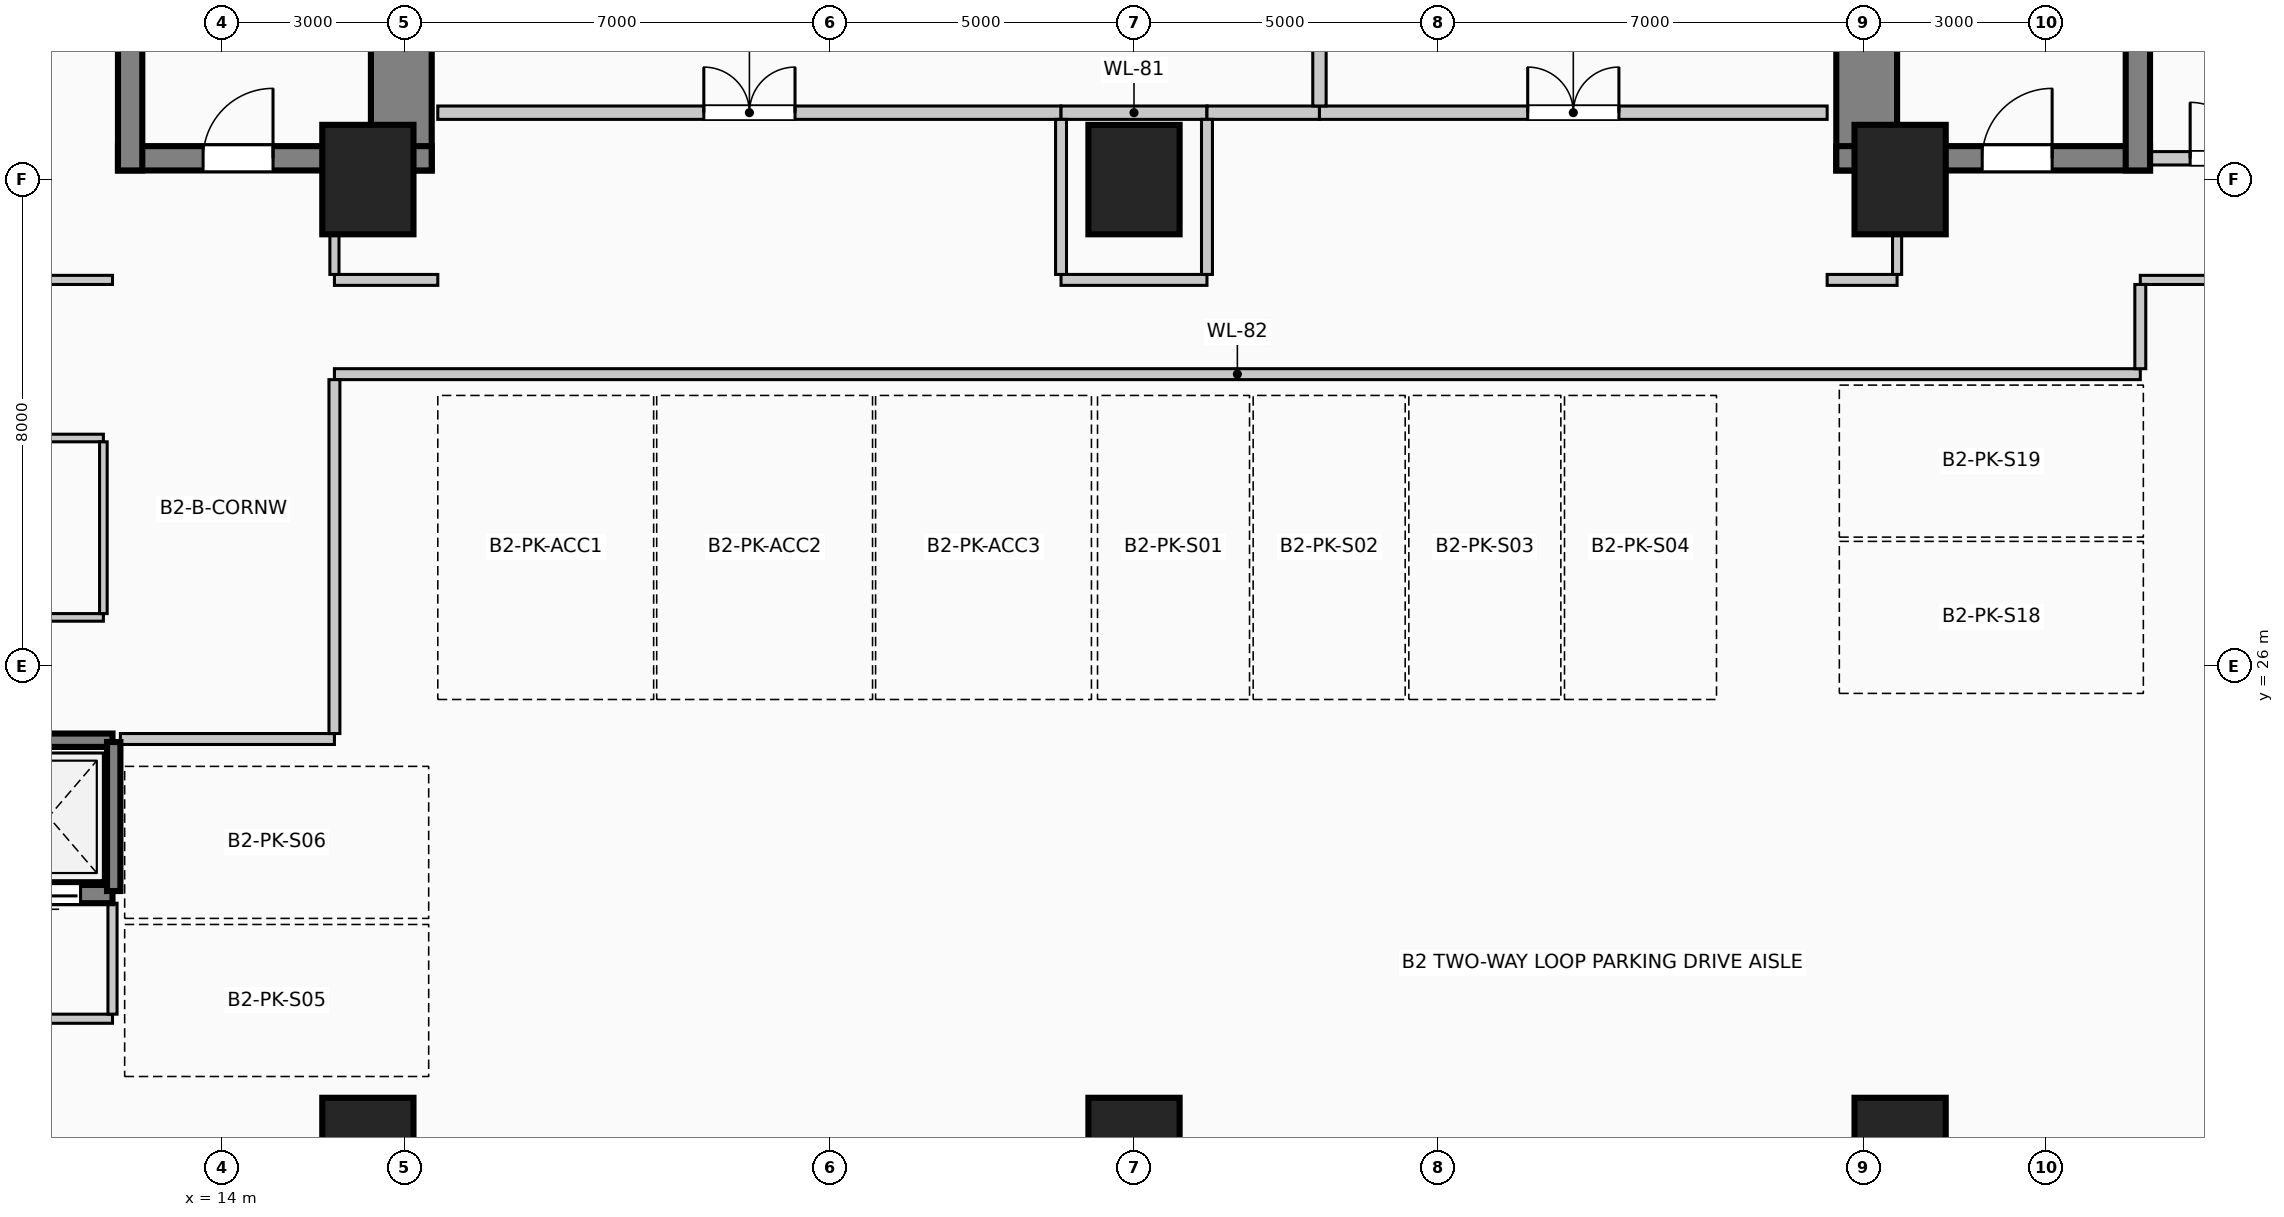
"""IFC4 building model, lengths in metres.
Left out: names, types, materials, properties, quantities, classifications, styles, units other than length and angle.
Written with IfcOpenShell. Run it as: python <this file> out.ifc"""

import sys

from ifc_helpers import new_model, si_unit, direction, frame, frame_2d, origin, origin_2d, place, context, subcontext, project, spatial, rectangle, extrude, element, fill, save


model = new_model("IFC4")
c1 = context("Model", 3, precision=1e-05, world=origin(), true_north=direction((0.0, 1.0)))
c2 = subcontext(c1, "Body", "Model", "MODEL_VIEW")
j1 = project(units=[si_unit("LENGTHUNIT", "METRE"), si_unit("PLANEANGLEUNIT", "RADIAN")], contexts=[c1])
p1 = place(None, origin())
s1 = spatial("IfcSite", under=j1, at=p1, CompositionType="ELEMENT")
p2 = place(p1, origin())
s2 = spatial("IfcBuilding", under=s1, at=p2, CompositionType="ELEMENT")
p3 = place(p2, frame((0.0, 0.0, -9.0)))
s3 = spatial("IfcBuildingStorey", under=s2, at=p3, CompositionType="ELEMENT", Elevation=-9.0)
p4 = place(p3, frame((16.95, 34.15, 0.0), z_axis=(0.0, 0.0, 1.0), x_axis=(0.0, 1.0, 0.0)))
e1 = element("IfcWall", 1, at=p4, inside=s3, PredefinedType="SHEAR", context=c2, shape_type="SweptSolid", body=[
    extrude(rectangle(XDim=9.28, YDim=1.0, at=frame_2d((4.64, 0.0))), origin(), (0.0, 0.0, 1.0), 4.5),
])
p5 = place(p3, frame((12.29, 34.35, 0.0), z_axis=(0.0, 0.0, 1.0), x_axis=(1.0, 0.0, 0.0)))
e2 = element("IfcWall", 2, at=p5, inside=s3, PredefinedType="SHEAR", context=c2, shape_type="SweptSolid", body=[
    extrude(rectangle(XDim=5.16, YDim=0.4, at=frame_2d((2.58, 0.0))), origin(), (0.0, 0.0, 1.0), 4.5),
])
p6 = place(p5, frame((1.4, 0.0, 0.0)))
e3 = element("IfcOpeningElement", 3, at=p6, cuts=e2, PredefinedType="OPENING", context=c2, shape_type="SweptSolid", body=[
    extrude(rectangle(XDim=1.15, YDim=2.2, at=frame_2d((0.575, 1.1))), frame((0.0, 0.21, 0.0), z_axis=(0.0, -1.0, 0.0), x_axis=(1.0, 0.0, 0.0)), (0.0, 0.0, 1.0), 0.42),
])
p7 = place(p3, frame((12.49, 34.15, 0.0), z_axis=(0.0, 0.0, 1.0), x_axis=(0.0, 1.0, 0.0)))
e4 = element("IfcWall", 4, at=p7, inside=s3, PredefinedType="SHEAR", context=c2, shape_type="SweptSolid", body=[
    extrude(rectangle(XDim=9.28, YDim=0.4, at=frame_2d((4.64, 0.0))), origin(), (0.0, 0.0, 1.0), 4.5),
])
p8 = place(p3, frame((41.05, 34.15, 0.0), z_axis=(0.0, 0.0, 1.0), x_axis=(0.0, 1.0, 0.0)))
e5 = element("IfcWall", 5, at=p8, inside=s3, PredefinedType="SHEAR", context=c2, shape_type="SweptSolid", body=[
    extrude(rectangle(XDim=9.28, YDim=1.0, at=frame_2d((4.64, 0.0))), origin(), (0.0, 0.0, 1.0), 4.5),
])
p9 = place(p3, frame((40.55, 34.35, 0.0), z_axis=(0.0, 0.0, 1.0), x_axis=(1.0, 0.0, 0.0)))
e6 = element("IfcWall", 6, at=p9, inside=s3, PredefinedType="SHEAR", context=c2, shape_type="SweptSolid", body=[
    extrude(rectangle(XDim=5.16, YDim=0.4, at=frame_2d((2.58, 0.0))), origin(), (0.0, 0.0, 1.0), 4.5),
])
p10 = place(p9, frame((2.4, 0.0, 0.0)))
e7 = element("IfcOpeningElement", 7, at=p10, cuts=e6, PredefinedType="OPENING", context=c2, shape_type="SweptSolid", body=[
    extrude(rectangle(XDim=1.15, YDim=2.2, at=frame_2d((0.575, 1.1))), frame((0.0, 0.21, 0.0), z_axis=(0.0, -1.0, 0.0), x_axis=(1.0, 0.0, 0.0)), (0.0, 0.0, 1.0), 0.42),
])
p11 = place(p3, frame((45.51, 34.15, 0.0), z_axis=(0.0, 0.0, 1.0), x_axis=(0.0, 1.0, 0.0)))
e8 = element("IfcWall", 8, at=p11, inside=s3, PredefinedType="SHEAR", context=c2, shape_type="SweptSolid", body=[
    extrude(rectangle(XDim=9.28, YDim=0.4, at=frame_2d((4.64, 0.0))), origin(), (0.0, 0.0, 1.0), 4.5),
])
for number, where, z_axis, x_axis in (
    (9, (16.4, 18.0, 0.0), (0.0, 0.0, 1.0), (1.0, 0.0, 0.0)),
    (10, (16.4, 34.0, 0.0), (0.0, 0.0, 1.0), (1.0, 0.0, 0.0)),
    (11, (29.0, 18.0, 0.0), (0.0, 0.0, 1.0), (1.0, 0.0, 0.0)),
    (12, (29.0, 34.0, 0.0), (0.0, 0.0, 1.0), (1.0, 0.0, 0.0)),
    (13, (41.6, 18.0, 0.0), (0.0, 0.0, 1.0), (1.0, 0.0, 0.0)),
    (14, (41.6, 34.0, 0.0), (0.0, 0.0, 1.0), (1.0, 0.0, 0.0)),
):
    element("IfcColumn", number, at=place(p3, frame(where, z_axis=z_axis, x_axis=x_axis)), inside=s3, PredefinedType="COLUMN", context=c2, shape_type="SweptSolid", body=[
        extrude(rectangle(XDim=1.5, YDim=1.8, at=origin_2d()), origin(), (0.0, 0.0, 1.0), 4.5),
    ])
p12 = place(p3, frame((12.2, 22.25, 0.0), z_axis=(0.0, 0.0, 1.0), x_axis=(-1.0, 0.0, 0.0)))
e15 = element("IfcWall", 15, at=p12, inside=s3, PredefinedType="SOLIDWALL", context=c2, shape_type="SweptSolid", body=[
    extrude(rectangle(XDim=2.15, YDim=0.3, at=frame_2d((1.075, 0.0))), origin(), (0.0, 0.0, 1.0), 4.5),
])
p13 = place(p12, frame((0.525, 0.0, 0.0)))
e16 = element("IfcOpeningElement", 16, at=p13, cuts=e15, PredefinedType="OPENING", context=c2, shape_type="SweptSolid", body=[
    extrude(rectangle(XDim=1.1, YDim=2.2, at=frame_2d((0.55, 1.1))), frame((0.0, 0.16, 0.0), z_axis=(0.0, -1.0, 0.0), x_axis=(1.0, 0.0, 0.0)), (0.0, 0.0, 1.0), 0.32),
])
p14 = place(p3, frame((3.55, 24.78, 0.0), z_axis=(0.0, 0.0, 1.0), x_axis=(1.0, 0.0, 0.0)))
e17 = element("IfcWall", 17, at=p14, inside=s3, PredefinedType="SOLIDWALL", context=c2, shape_type="SweptSolid", body=[
    extrude(rectangle(XDim=8.65, YDim=0.22, at=frame_2d((4.325, 0.0))), origin(), (0.0, 0.0, 1.0), 4.5),
])
p15 = place(p3, frame((12.22, 22.3, 0.0), z_axis=(0.0, 0.0, 1.0), x_axis=(0.0, 1.0, 0.0)))
e18 = element("IfcWall", 18, at=p15, inside=s3, PredefinedType="SOLIDWALL", context=c2, shape_type="SweptSolid", body=[
    extrude(rectangle(XDim=2.45, YDim=0.22, at=frame_2d((1.225, 0.0))), origin(), (0.0, 0.0, 1.0), 4.5),
])
p16 = place(p3, frame((45.72, 34.35, 0.0), z_axis=(0.0, 0.0, 1.0), x_axis=(1.0, 0.0, 0.0)))
e19 = element("IfcWall", 19, at=p16, inside=s3, PredefinedType="PARTITIONING", context=c2, shape_type="SweptSolid", body=[
    extrude(rectangle(XDim=4.56, YDim=0.22, at=frame_2d((2.28, 0.0))), origin(), (0.0, 0.0, 1.0), 3.145),
])
p17 = place(p16, frame((0.65, 0.0, 0.0)))
e20 = element("IfcOpeningElement", 20, at=p17, cuts=e19, PredefinedType="OPENING", context=c2, shape_type="SweptSolid", body=[
    extrude(rectangle(XDim=0.92, YDim=2.1, at=frame_2d((0.46, 1.05))), frame((0.0, 0.12, 0.0), z_axis=(0.0, -1.0, 0.0), x_axis=(1.0, 0.0, 0.0)), (0.0, 0.0, 1.0), 0.24),
])
p18 = place(p16, frame((2.95, 0.0, 0.0)))
e21 = element("IfcOpeningElement", 21, at=p18, cuts=e19, PredefinedType="OPENING", context=c2, shape_type="SweptSolid", body=[
    extrude(rectangle(XDim=0.88, YDim=2.1, at=frame_2d((0.44, 1.05))), frame((0.0, 0.12, 0.0), z_axis=(0.0, -1.0, 0.0), x_axis=(1.0, 0.0, 0.0)), (0.0, 0.0, 1.0), 0.24),
])
p19 = place(p3, frame((3.55, 20.2, 0.0), z_axis=(0.0, 0.0, 1.0), x_axis=(1.0, 0.0, 0.0)))
e22 = element("IfcWall", 22, at=p19, inside=s3, PredefinedType="PARTITIONING", context=c2, shape_type="SweptSolid", body=[
    extrude(rectangle(XDim=8.65, YDim=0.15, at=frame_2d((4.325, 0.0))), origin(), (0.0, 0.0, 1.0), 4.1),
])
p20 = place(p3, frame((12.33, 24.8, 0.0), z_axis=(0.0, 0.0, 1.0), x_axis=(1.0, 0.0, 0.0)))
e23 = element("IfcWall", 23, at=p20, inside=s3, PredefinedType="PARTITIONING", context=c2, shape_type="SweptSolid", body=[
    extrude(rectangle(XDim=3.52, YDim=0.18, at=frame_2d((1.76, 0.0))), origin(), (0.0, 0.0, 1.0), 4.1),
])
p21 = place(p3, frame((7.85, 26.8, 0.0), z_axis=(0.0, 0.0, 1.0), x_axis=(1.0, 0.0, 0.0)))
e24 = element("IfcWall", 24, at=p21, inside=s3, PredefinedType="PARTITIONING", context=c2, shape_type="SweptSolid", body=[
    extrude(rectangle(XDim=4.2, YDim=0.125, at=frame_2d((2.1, 0.0))), origin(), (0.0, 0.0, 1.0), 4.1),
])
p22 = place(p21, frame((1.64, 0.0, 0.0)))
e25 = element("IfcOpeningElement", 25, at=p22, cuts=e24, PredefinedType="OPENING", context=c2, shape_type="SweptSolid", body=[
    extrude(rectangle(XDim=0.92, YDim=2.1, at=frame_2d((0.46, 1.05))), frame((0.0, 0.073, 0.0), z_axis=(0.0, -1.0, 0.0), x_axis=(1.0, 0.0, 0.0)), (0.0, 0.0, 1.0), 0.145),
])
p23 = place(p3, frame((7.85, 29.75, 0.0), z_axis=(0.0, 0.0, 1.0), x_axis=(1.0, 0.0, 0.0)))
e26 = element("IfcWall", 26, at=p23, inside=s3, PredefinedType="PARTITIONING", context=c2, shape_type="SweptSolid", body=[
    extrude(rectangle(XDim=4.2, YDim=0.125, at=frame_2d((2.1, 0.0))), origin(), (0.0, 0.0, 1.0), 4.1),
])
p24 = place(p3, frame((15.85, 30.8, 0.0), z_axis=(0.0, 0.0, 1.0), x_axis=(1.0, 0.0, 0.0)))
e27 = element("IfcWall", 27, at=p24, inside=s3, PredefinedType="PARTITIONING", context=c2, shape_type="SweptSolid", body=[
    extrude(rectangle(XDim=29.7, YDim=0.18, at=frame_2d((14.85, 0.0))), origin(), (0.0, 0.0, 1.0), 4.1),
])
p25 = place(p3, frame((3.55, 32.35, 0.0), z_axis=(0.0, 0.0, 1.0), x_axis=(1.0, 0.0, 0.0)))
e28 = element("IfcWall", 28, at=p25, inside=s3, PredefinedType="PARTITIONING", context=c2, shape_type="SweptSolid", body=[
    extrude(rectangle(XDim=8.65, YDim=0.15, at=frame_2d((4.325, 0.0))), origin(), (0.0, 0.0, 1.0), 4.1),
])
p26 = place(p3, frame((15.85, 32.35, 0.0), z_axis=(0.0, 0.0, 1.0), x_axis=(1.0, 0.0, 0.0)))
e29 = element("IfcWall", 29, at=p26, inside=s3, PredefinedType="PARTITIONING", context=c2, shape_type="SweptSolid", body=[
    extrude(rectangle(XDim=1.7, YDim=0.18, at=frame_2d((0.85, 0.0))), origin(), (0.0, 0.0, 1.0), 4.1),
])
p27 = place(p3, frame((27.8, 32.35, 0.0), z_axis=(0.0, 0.0, 1.0), x_axis=(1.0, 0.0, 0.0)))
e30 = element("IfcWall", 30, at=p27, inside=s3, PredefinedType="PARTITIONING", context=c2, shape_type="SweptSolid", body=[
    extrude(rectangle(XDim=2.4, YDim=0.18, at=frame_2d((1.2, 0.0))), origin(), (0.0, 0.0, 1.0), 4.1),
])
p28 = place(p3, frame((40.4, 32.35, 0.0), z_axis=(0.0, 0.0, 1.0), x_axis=(1.0, 0.0, 0.0)))
e31 = element("IfcWall", 31, at=p28, inside=s3, PredefinedType="PARTITIONING", context=c2, shape_type="SweptSolid", body=[
    extrude(rectangle(XDim=1.15, YDim=0.18, at=frame_2d((0.575, 0.0))), origin(), (0.0, 0.0, 1.0), 4.1),
])
p29 = place(p3, frame((45.55, 32.35, 0.0), z_axis=(0.0, 0.0, 1.0), x_axis=(1.0, 0.0, 0.0)))
e32 = element("IfcWall", 32, at=p29, inside=s3, PredefinedType="PARTITIONING", context=c2, shape_type="SweptSolid", body=[
    extrude(rectangle(XDim=8.9, YDim=0.15, at=frame_2d((4.45, 0.0))), origin(), (0.0, 0.0, 1.0), 4.1),
])
p30 = place(p3, frame((17.55, 35.1, 0.0), z_axis=(0.0, 0.0, 1.0), x_axis=(1.0, 0.0, 0.0)))
e33 = element("IfcWall", 33, at=p30, inside=s3, PredefinedType="PARTITIONING", context=c2, shape_type="SweptSolid", body=[
    extrude(rectangle(XDim=10.25, YDim=0.22, at=frame_2d((5.125, 0.0))), origin(), (0.0, 0.0, 1.0), 4.1),
])
p31 = place(p30, frame((4.375, 0.0, 0.0)))
e34 = element("IfcOpeningElement", 34, at=p31, cuts=e33, PredefinedType="OPENING", context=c2, shape_type="SweptSolid", body=[
    extrude(rectangle(XDim=1.5, YDim=2.25, at=frame_2d((0.75, 1.125))), frame((0.0, 0.12, 0.0), z_axis=(0.0, -1.0, 0.0), x_axis=(1.0, 0.0, 0.0)), (0.0, 0.0, 1.0), 0.24),
])
p32 = place(p3, frame((27.8, 35.1, 0.0), z_axis=(0.0, 0.0, 1.0), x_axis=(1.0, 0.0, 0.0)))
e35 = element("IfcWall", 35, at=p32, inside=s3, PredefinedType="PARTITIONING", context=c2, shape_type="SweptSolid", body=[
    extrude(rectangle(XDim=2.4, YDim=0.22, at=frame_2d((1.2, 0.0))), origin(), (0.0, 0.0, 1.0), 4.1),
])
p33 = place(p3, frame((30.2, 35.1, 0.0), z_axis=(0.0, 0.0, 1.0), x_axis=(1.0, 0.0, 0.0)))
e36 = element("IfcWall", 36, at=p33, inside=s3, PredefinedType="PARTITIONING", context=c2, shape_type="SweptSolid", body=[
    extrude(rectangle(XDim=1.85, YDim=0.22, at=frame_2d((0.925, 0.0))), origin(), (0.0, 0.0, 1.0), 4.1),
])
p34 = place(p3, frame((32.05, 35.1, 0.0), z_axis=(0.0, 0.0, 1.0), x_axis=(1.0, 0.0, 0.0)))
e37 = element("IfcWall", 37, at=p34, inside=s3, PredefinedType="PARTITIONING", context=c2, shape_type="SweptSolid", body=[
    extrude(rectangle(XDim=8.35, YDim=0.22, at=frame_2d((4.175, 0.0))), origin(), (0.0, 0.0, 1.0), 4.1),
])
p35 = place(p34, frame((3.425, 0.0, 0.0)))
e38 = element("IfcOpeningElement", 38, at=p35, cuts=e37, PredefinedType="OPENING", context=c2, shape_type="SweptSolid", body=[
    extrude(rectangle(XDim=1.5, YDim=2.25, at=frame_2d((0.75, 1.125))), frame((0.0, 0.12, 0.0), z_axis=(0.0, -1.0, 0.0), x_axis=(1.0, 0.0, 0.0)), (0.0, 0.0, 1.0), 0.24),
])
p36 = place(p3, frame((12.05, 26.863, 0.0), z_axis=(0.0, 0.0, 1.0), x_axis=(0.0, 1.0, 0.0)))
e39 = element("IfcWall", 39, at=p36, inside=s3, PredefinedType="PARTITIONING", context=c2, shape_type="SweptSolid", body=[
    extrude(rectangle(XDim=2.825, YDim=0.125, at=frame_2d((1.413, 0.0))), origin(), (0.0, 0.0, 1.0), 4.1),
])
p37 = place(p3, frame((12.2, 20.275, 0.0), z_axis=(0.0, 0.0, 1.0), x_axis=(0.0, 1.0, 0.0)))
e40 = element("IfcWall", 40, at=p37, inside=s3, PredefinedType="PARTITIONING", context=c2, shape_type="SweptSolid", body=[
    extrude(rectangle(XDim=1.825, YDim=0.15, at=frame_2d((0.913, 0.0))), origin(), (0.0, 0.0, 1.0), 4.1),
])
p38 = place(p3, frame((15.85, 24.89, 0.0), z_axis=(0.0, 0.0, 1.0), x_axis=(0.0, 1.0, 0.0)))
e41 = element("IfcWall", 41, at=p38, inside=s3, PredefinedType="PARTITIONING", context=c2, shape_type="SweptSolid", body=[
    extrude(rectangle(XDim=5.82, YDim=0.18, at=frame_2d((2.91, 0.0))), origin(), (0.0, 0.0, 1.0), 4.1),
])
p39 = place(p3, frame((15.85, 32.44, 0.0), z_axis=(0.0, 0.0, 1.0), x_axis=(0.0, 1.0, 0.0)))
e42 = element("IfcWall", 42, at=p39, inside=s3, PredefinedType="PARTITIONING", context=c2, shape_type="SweptSolid", body=[
    extrude(rectangle(XDim=0.66, YDim=0.15, at=frame_2d((0.33, 0.0))), origin(), (0.0, 0.0, 1.0), 4.1),
])
for number, where, z_axis, x_axis in (
    (43, (27.8, 32.44, 0.0), (0.0, 0.0, 1.0), (0.0, 1.0, 0.0)),
    (44, (30.2, 32.44, 0.0), (0.0, 0.0, 1.0), (0.0, 1.0, 0.0)),
):
    element("IfcWall", number, at=place(p3, frame(where, z_axis=z_axis, x_axis=x_axis)), inside=s3, PredefinedType="PARTITIONING", context=c2, shape_type="SweptSolid", body=[
        extrude(rectangle(XDim=2.55, YDim=0.18, at=frame_2d((1.275, 0.0))), origin(), (0.0, 0.0, 1.0), 4.1),
    ])
p40 = place(p3, frame((32.05, 35.21, 0.0), z_axis=(0.0, 0.0, 1.0), x_axis=(0.0, 1.0, 0.0)))
e45 = element("IfcWall", 45, at=p40, inside=s3, PredefinedType="PARTITIONING", context=c2, shape_type="SweptSolid", body=[
    extrude(rectangle(XDim=8.88, YDim=0.22, at=frame_2d((4.44, 0.0))), origin(), (0.0, 0.0, 1.0), 4.1),
])
p41 = place(p3, frame((41.55, 32.44, 0.0), z_axis=(0.0, 0.0, 1.0), x_axis=(0.0, 1.0, 0.0)))
e46 = element("IfcWall", 46, at=p41, inside=s3, PredefinedType="PARTITIONING", context=c2, shape_type="SweptSolid", body=[
    extrude(rectangle(XDim=0.66, YDim=0.15, at=frame_2d((0.33, 0.0))), origin(), (0.0, 0.0, 1.0), 3.145),
])
p42 = place(p3, frame((45.55, 30.89, 0.0), z_axis=(0.0, 0.0, 1.0), x_axis=(0.0, 1.0, 0.0)))
e47 = element("IfcWall", 47, at=p42, inside=s3, PredefinedType="PARTITIONING", context=c2, shape_type="SweptSolid", body=[
    extrude(rectangle(XDim=1.385, YDim=0.18, at=frame_2d((0.692, 0.0))), origin(), (0.0, 0.0, 1.0), 4.1),
])
p43 = place(p13, origin())
e48 = element("IfcDoor", 48, at=p43, inside=s3, OperationType="SLIDING_TO_RIGHT", PredefinedType="DOOR", context=c2, shape_type="SweptSolid", body=[
    extrude(rectangle(XDim=1.1, YDim=2.2, at=frame_2d((0.55, 1.1))), frame((0.0, 0.025, 0.0), z_axis=(0.0, -1.0, 0.0), x_axis=(1.0, 0.0, 0.0)), (0.0, 0.0, 1.0), 0.05),
])
fill(e16, e48)
p44 = place(p6, origin())
e49 = element("IfcDoor", 49, at=p44, inside=s3, OperationType="SINGLE_SWING_RIGHT", PredefinedType="DOOR", context=c2, shape_type="SweptSolid", body=[
    extrude(rectangle(XDim=1.15, YDim=2.2, at=frame_2d((0.575, 1.1))), frame((0.0, 0.025, 0.0), z_axis=(0.0, -1.0, 0.0), x_axis=(1.0, 0.0, 0.0)), (0.0, 0.0, 1.0), 0.05),
])
fill(e3, e49)
p45 = place(p10, origin())
e50 = element("IfcDoor", 50, at=p45, inside=s3, OperationType="SINGLE_SWING_RIGHT", PredefinedType="DOOR", context=c2, shape_type="SweptSolid", body=[
    extrude(rectangle(XDim=1.15, YDim=2.2, at=frame_2d((0.575, 1.1))), frame((0.0, 0.025, 0.0), z_axis=(0.0, -1.0, 0.0), x_axis=(1.0, 0.0, 0.0)), (0.0, 0.0, 1.0), 0.05),
])
fill(e7, e50)
p46 = place(p17, origin())
e51 = element("IfcDoor", 51, at=p46, inside=s3, OperationType="SINGLE_SWING_LEFT", PredefinedType="DOOR", context=c2, shape_type="SweptSolid", body=[
    extrude(rectangle(XDim=0.92, YDim=2.1, at=frame_2d((0.46, 1.05))), frame((0.0, 0.025, 0.0), z_axis=(0.0, -1.0, 0.0), x_axis=(1.0, 0.0, 0.0)), (0.0, 0.0, 1.0), 0.05),
])
fill(e20, e51)
p47 = place(p31, origin())
e52 = element("IfcDoor", 52, at=p47, inside=s3, OperationType="DOUBLE_DOOR_SINGLE_SWING", PredefinedType="DOOR", context=c2, shape_type="SweptSolid", body=[
    extrude(rectangle(XDim=1.5, YDim=2.25, at=frame_2d((0.75, 1.125))), frame((0.0, 0.025, 0.0), z_axis=(0.0, -1.0, 0.0), x_axis=(1.0, 0.0, 0.0)), (0.0, 0.0, 1.0), 0.05),
])
fill(e34, e52)
p48 = place(p35, origin())
e53 = element("IfcDoor", 53, at=p48, inside=s3, OperationType="DOUBLE_DOOR_SINGLE_SWING", PredefinedType="DOOR", context=c2, shape_type="SweptSolid", body=[
    extrude(rectangle(XDim=1.5, YDim=2.25, at=frame_2d((0.75, 1.125))), frame((0.0, 0.025, 0.0), z_axis=(0.0, -1.0, 0.0), x_axis=(1.0, 0.0, 0.0)), (0.0, 0.0, 1.0), 0.05),
])
fill(e38, e53)
save(model, sys.argv[1])
